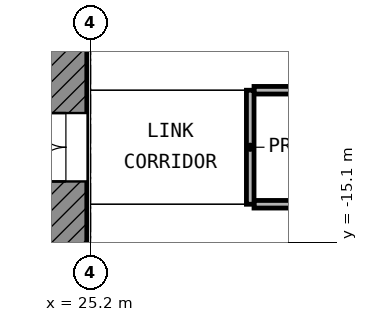
"""IFC4 building model, lengths in metres.
Left out: names, types, materials, properties, quantities, classifications, styles, units other than length and angle.
Written with IfcOpenShell. Run it as: python <this file> out.ifc"""

import sys

from ifc_helpers import new_model, si_unit, direction, frame, frame_2d, origin, place, context, subcontext, project, spatial, rectangle, extrude, element, fill, save


model = new_model("IFC4")
c1 = context("Model", 3, precision=1e-05, world=origin(), true_north=direction((0.0, 1.0)))
c2 = subcontext(c1, "Body", "Model", "MODEL_VIEW")
j1 = project(units=[si_unit("LENGTHUNIT", "METRE"), si_unit("PLANEANGLEUNIT", "RADIAN")], contexts=[c1])
p1 = place(None, origin())
s1 = spatial("IfcSite", under=j1, at=p1, CompositionType="ELEMENT")
p2 = place(p1, origin())
s2 = spatial("IfcBuilding", under=s1, at=p2, CompositionType="ELEMENT")
p3 = place(p2, frame((0.0, 0.0, 60.2)))
s3 = spatial("IfcBuildingStorey", under=s2, at=p3, CompositionType="ELEMENT", Elevation=60.2)
p4 = place(p3, frame((24.55, -24.0, 0.0), z_axis=(0.0, 0.0, 1.0), x_axis=(0.0, 1.0, 0.0)))
e1 = element("IfcWall", 1, at=p4, inside=s3, PredefinedType="SHEAR", context=c2, shape_type="SweptSolid", body=[
    extrude(rectangle(XDim=18.6, YDim=1.1, at=frame_2d((9.3, 0.0))), origin(), (0.0, 0.0, 1.0), 3.9),
])
p5 = place(p4, frame((10.5, 0.0, 0.0)))
e2 = element("IfcOpeningElement", 2, at=p5, cuts=e1, PredefinedType="OPENING", context=c2, shape_type="SweptSolid", body=[
    extrude(rectangle(XDim=1.8, YDim=2.1, at=frame_2d((0.9, 1.05))), frame((0.0, 0.56, 0.0), z_axis=(0.0, -1.0, 0.0), x_axis=(1.0, 0.0, 0.0)), (0.0, 0.0, 1.0), 1.12),
])
p6 = place(p3, frame((29.5, -14.1, 0.0), z_axis=(0.0, 0.0, 1.0), x_axis=(1.0, 0.0, 0.0)))
e3 = element("IfcWall", 3, at=p6, inside=s3, PredefinedType="PARTITIONING", context=c2, shape_type="SweptSolid", body=[
    extrude(rectangle(XDim=12.4, YDim=0.2, at=frame_2d((6.2, 0.0))), origin(), (0.0, 0.0, 1.0), 3.9),
])
p7 = place(p6, frame((5.6, 0.0, 0.0)))
e4 = element("IfcOpeningElement", 4, at=p7, cuts=e3, PredefinedType="OPENING", context=c2, shape_type="SweptSolid", body=[
    extrude(rectangle(XDim=1.2, YDim=2.1, at=frame_2d((0.6, 1.05))), frame((0.0, 0.11, 0.0), z_axis=(0.0, -1.0, 0.0), x_axis=(1.0, 0.0, 0.0)), (0.0, 0.0, 1.0), 0.22),
])
p8 = place(p3, frame((29.5, -11.1, 0.0), z_axis=(0.0, 0.0, 1.0), x_axis=(1.0, 0.0, 0.0)))
e5 = element("IfcWall", 5, at=p8, inside=s3, PredefinedType="PARTITIONING", context=c2, shape_type="SweptSolid", body=[
    extrude(rectangle(XDim=12.4, YDim=0.2, at=frame_2d((6.2, 0.0))), origin(), (0.0, 0.0, 1.0), 3.9),
])
p9 = place(p3, frame((29.4, -14.1, 0.0), z_axis=(0.0, 0.0, 1.0), x_axis=(0.0, 1.0, 0.0)))
e6 = element("IfcWall", 6, at=p9, inside=s3, PredefinedType="PARTITIONING", context=c2, shape_type="SweptSolid", body=[
    extrude(rectangle(XDim=3.0, YDim=0.2, at=frame_2d((1.5, 0.0))), origin(), (0.0, 0.0, 1.0), 3.9),
])
p10 = place(p5, origin())
e7 = element("IfcDoor", 7, at=p10, inside=s3, OperationType="DOUBLE_DOOR_SINGLE_SWING", PredefinedType="DOOR", context=c2, shape_type="SweptSolid", body=[
    extrude(rectangle(XDim=1.8, YDim=2.1, at=frame_2d((0.9, 1.05))), frame((0.0, 0.025, 0.0), z_axis=(0.0, -1.0, 0.0), x_axis=(1.0, 0.0, 0.0)), (0.0, 0.0, 1.0), 0.05),
])
fill(e2, e7)
save(model, sys.argv[1])
